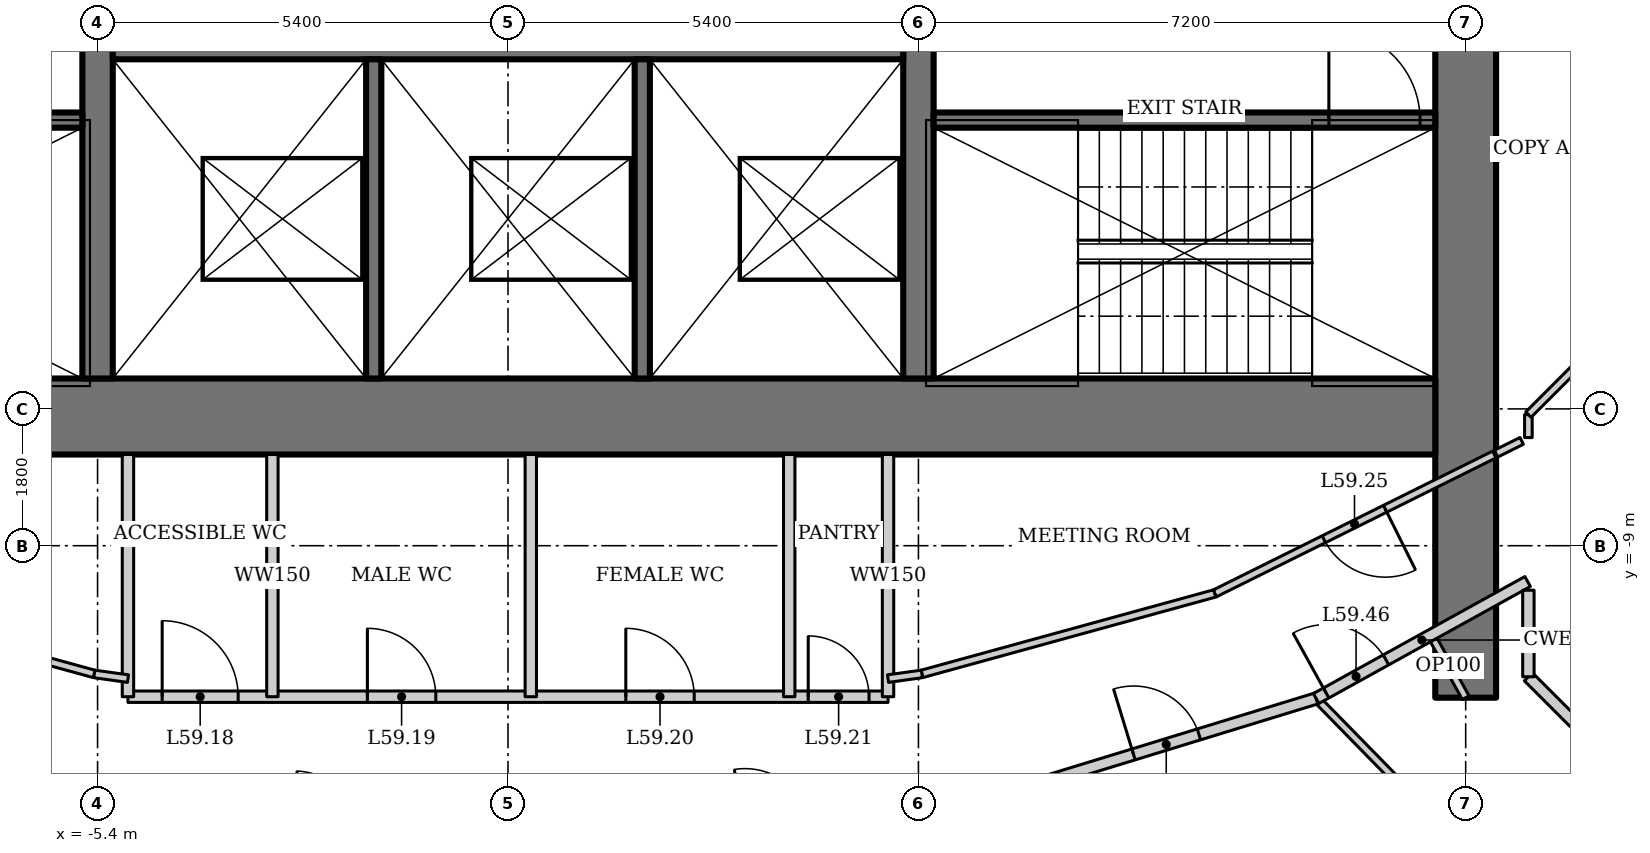
"""IFC4 building model, lengths in metres.
Left out: names, types, materials, properties, quantities, classifications, styles, units other than length and angle.
Written with IfcOpenShell. Run it as: python <this file> out.ifc"""

import sys

from ifc_helpers import new_model, si_unit, direction, frame, frame_2d, origin, place, context, subcontext, project, spatial, rectangle, extrude, element, fill, save


model = new_model("IFC4")
c1 = context("Model", 3, precision=1e-05, world=origin(), true_north=direction((0.0, 1.0)))
c2 = subcontext(c1, "Body", "Model", "MODEL_VIEW")
j1 = project(units=[si_unit("LENGTHUNIT", "METRE"), si_unit("PLANEANGLEUNIT", "RADIAN")], contexts=[c1])
p1 = place(None, origin())
s1 = spatial("IfcSite", under=j1, at=p1, CompositionType="ELEMENT")
p2 = place(p1, origin())
s2 = spatial("IfcBuilding", under=s1, at=p2, CompositionType="ELEMENT")
p3 = place(p2, frame((0.0, 0.0, 253.6)))
s3 = spatial("IfcBuildingStorey", under=s2, at=p3, CompositionType="ELEMENT", Elevation=253.6)
p4 = place(p3, frame((12.6, -11.0, 0.0), z_axis=(0.0, 0.0, 1.0), x_axis=(0.0, 1.0, 0.0)))
e1 = element("IfcWall", 1, at=p4, inside=s3, PredefinedType="SHEAR", context=c2, shape_type="SweptSolid", body=[
    extrude(rectangle(XDim=22.0, YDim=0.8, at=frame_2d((11.0, 0.0))), origin(), (0.0, 0.0, 1.0), 4.2),
])
p5 = place(p4, frame((10.1, 0.0, 0.0)))
e2 = element("IfcOpeningElement", 2, at=p5, cuts=e1, PredefinedType="OPENING", context=c2, shape_type="SweptSolid", body=[
    extrude(rectangle(XDim=1.8, YDim=2.1, at=frame_2d((0.9, 1.05))), frame((0.0, 0.41, 0.0), z_axis=(0.0, -1.0, 0.0), x_axis=(1.0, 0.0, 0.0)), (0.0, 0.0, 1.0), 0.82),
])
p6 = place(p3, frame((-12.2, -7.3, 0.0), z_axis=(0.0, 0.0, 1.0), x_axis=(1.0, 0.0, 0.0)))
e3 = element("IfcWall", 3, at=p6, inside=s3, PredefinedType="SHEAR", context=c2, shape_type="SweptSolid", body=[
    extrude(rectangle(XDim=24.4, YDim=1.0, at=frame_2d((12.2, 0.0))), origin(), (0.0, 0.0, 1.0), 4.2),
])
p7 = place(p3, frame((5.4, -6.8, 0.0), z_axis=(0.0, 0.0, 1.0), x_axis=(0.0, 1.0, 0.0)))
e4 = element("IfcWall", 4, at=p7, inside=s3, PredefinedType="SHEAR", context=c2, shape_type="SweptSolid", body=[
    extrude(rectangle(XDim=14.6, YDim=0.4, at=frame_2d((7.3, 0.0))), origin(), (0.0, 0.0, 1.0), 4.2),
])
p8 = place(p7, frame((5.9, 0.0, 0.0)))
e5 = element("IfcOpeningElement", 5, at=p8, cuts=e4, PredefinedType="OPENING", context=c2, shape_type="SweptSolid", body=[
    extrude(rectangle(XDim=1.8, YDim=2.1, at=frame_2d((0.9, 1.05))), frame((0.0, 0.21, 0.0), z_axis=(0.0, -1.0, 0.0), x_axis=(1.0, 0.0, 0.0)), (0.0, 0.0, 1.0), 0.42),
])
p9 = place(p3, frame((-5.4, 7.8, 0.0), z_axis=(0.0, 0.0, 1.0), x_axis=(0.0, -1.0, 0.0)))
e6 = element("IfcWall", 6, at=p9, inside=s3, PredefinedType="SHEAR", context=c2, shape_type="SweptSolid", body=[
    extrude(rectangle(XDim=14.6, YDim=0.4, at=frame_2d((7.3, 0.0))), origin(), (0.0, 0.0, 1.0), 4.2),
])
p10 = place(p9, frame((6.4, 0.0, 0.0)))
e7 = element("IfcOpeningElement", 7, at=p10, cuts=e6, PredefinedType="OPENING", context=c2, shape_type="SweptSolid", body=[
    extrude(rectangle(XDim=1.8, YDim=2.1, at=frame_2d((0.9, 1.05))), frame((0.0, 0.21, 0.0), z_axis=(0.0, -1.0, 0.0), x_axis=(1.0, 0.0, 0.0)), (0.0, 0.0, 1.0), 0.42),
])
p11 = place(p3, frame((-5.2, -2.4, 0.0), z_axis=(0.0, 0.0, 1.0), x_axis=(1.0, 0.0, 0.0)))
e8 = element("IfcWall", 8, at=p11, inside=s3, PredefinedType="SHEAR", context=c2, shape_type="SweptSolid", body=[
    extrude(rectangle(XDim=10.4, YDim=0.4, at=frame_2d((5.2, 0.0))), origin(), (0.0, 0.0, 1.0), 4.2),
])
p12 = place(p11, frame((1.683, 0.0, 0.0)))
e9 = element("IfcOpeningElement", 9, at=p12, cuts=e8, PredefinedType="OPENING", context=c2, shape_type="SweptSolid", body=[
    extrude(rectangle(XDim=1.1, YDim=2.2, at=frame_2d((0.55, 1.1))), frame((0.0, 0.21, 0.0), z_axis=(0.0, -1.0, 0.0), x_axis=(1.0, 0.0, 0.0)), (0.0, 0.0, 1.0), 0.42),
])
p13 = place(p11, frame((5.217, 0.0, 0.0)))
e10 = element("IfcOpeningElement", 10, at=p13, cuts=e8, PredefinedType="OPENING", context=c2, shape_type="SweptSolid", body=[
    extrude(rectangle(XDim=1.1, YDim=2.2, at=frame_2d((0.55, 1.1))), frame((0.0, 0.21, 0.0), z_axis=(0.0, -1.0, 0.0), x_axis=(1.0, 0.0, 0.0)), (0.0, 0.0, 1.0), 0.42),
])
p14 = place(p11, frame((8.75, 0.0, 0.0)))
e11 = element("IfcOpeningElement", 11, at=p14, cuts=e8, PredefinedType="OPENING", context=c2, shape_type="SweptSolid", body=[
    extrude(rectangle(XDim=1.1, YDim=2.2, at=frame_2d((0.55, 1.1))), frame((0.0, 0.21, 0.0), z_axis=(0.0, -1.0, 0.0), x_axis=(1.0, 0.0, 0.0)), (0.0, 0.0, 1.0), 0.42),
])
for number, where, z_axis, x_axis in (
    (12, (-1.767, -2.6, 0.0), (0.0, 0.0, 1.0), (0.0, -1.0, 0.0)),
    (13, (1.767, -2.6, 0.0), (0.0, 0.0, 1.0), (0.0, -1.0, 0.0)),
):
    element("IfcWall", number, at=place(p3, frame(where, z_axis=z_axis, x_axis=x_axis)), inside=s3, PredefinedType="SOLIDWALL", context=c2, shape_type="SweptSolid", body=[
        extrude(rectangle(XDim=4.2, YDim=0.2, at=frame_2d((2.1, 0.0))), origin(), (0.0, 0.0, 1.0), 4.2),
    ])
p15 = place(p3, frame((5.6, -3.4, 0.0), z_axis=(0.0, 0.0, 1.0), x_axis=(1.0, 0.0, 0.0)))
e14 = element("IfcWall", 14, at=p15, inside=s3, PredefinedType="SHEAR", context=c2, shape_type="SweptSolid", body=[
    extrude(rectangle(XDim=6.6, YDim=0.2, at=frame_2d((3.3, 0.0))), origin(), (0.0, 0.0, 1.0), 4.2),
])
p16 = place(p15, frame((5.2, 0.0, 0.0)))
e15 = element("IfcOpeningElement", 15, at=p16, cuts=e14, PredefinedType="OPENING", context=c2, shape_type="SweptSolid", body=[
    extrude(rectangle(XDim=1.2, YDim=2.1, at=frame_2d((0.6, 1.05))), frame((0.0, 0.11, 0.0), z_axis=(0.0, -1.0, 0.0), x_axis=(1.0, 0.0, 0.0)), (0.0, 0.0, 1.0), 0.22),
])
p17 = place(p3, frame((-5.6, -3.4, 0.0), z_axis=(0.0, 0.0, 1.0), x_axis=(-1.0, 0.0, 0.0)))
e16 = element("IfcWall", 16, at=p17, inside=s3, PredefinedType="SHEAR", context=c2, shape_type="SweptSolid", body=[
    extrude(rectangle(XDim=6.6, YDim=0.2, at=frame_2d((3.3, 0.0))), origin(), (0.0, 0.0, 1.0), 4.2),
])
p18 = place(p17, frame((5.2, 0.0, 0.0)))
e17 = element("IfcOpeningElement", 17, at=p18, cuts=e16, PredefinedType="OPENING", context=c2, shape_type="SweptSolid", body=[
    extrude(rectangle(XDim=1.2, YDim=2.1, at=frame_2d((0.6, 1.05))), frame((0.0, 0.11, 0.0), z_axis=(0.0, -1.0, 0.0), x_axis=(1.0, 0.0, 0.0)), (0.0, 0.0, 1.0), 0.22),
])
p19 = place(p3, frame((15.709, -16.199, 0.0), z_axis=(0.0, 0.0, 1.0), x_axis=(-0.699362525935, 0.714767135029, 0.0)))
e18 = element("IfcWall", 18, at=p19, inside=s3, PredefinedType="PARTITIONING", context=c2, shape_type="SweptSolid", body=[
    extrude(rectangle(XDim=7.259, YDim=0.1, at=frame_2d((3.629, 0.0))), origin(), (0.0, 0.0, 1.0), 3.41),
])
p20 = place(p3, frame((6.288, -12.341, 0.0), z_axis=(0.0, 0.0, 1.0), x_axis=(0.956185837153, 0.292760388079, 0.0)))
e19 = element("IfcWall", 19, at=p20, inside=s3, PredefinedType="PARTITIONING", context=c2, shape_type="SweptSolid", body=[
    extrude(rectangle(XDim=4.544, YDim=0.15, at=frame_2d((2.272, 0.0))), origin(), (0.0, 0.0, 1.0), 4.05),
])
p21 = place(p20, frame((2.031, 0.0, 0.0)))
e20 = element("IfcOpeningElement", 20, at=p21, cuts=e19, PredefinedType="OPENING", context=c2, shape_type="SweptSolid", body=[
    extrude(rectangle(XDim=0.9, YDim=2.1, at=frame_2d((0.45, 1.05))), frame((0.0, 0.085, 0.0), z_axis=(0.0, -1.0, 0.0), x_axis=(1.0, 0.0, 0.0)), (0.0, 0.0, 1.0), 0.17),
])
p22 = place(p3, frame((-5.0, -10.987, 0.0), z_axis=(0.0, 0.0, 1.0), x_axis=(1.0, 0.0, 0.0)))
e21 = element("IfcWall", 21, at=p22, inside=s3, PredefinedType="SOLIDWALL", context=c2, shape_type="SweptSolid", body=[
    extrude(rectangle(XDim=10.0, YDim=0.15, at=frame_2d((5.0, 0.0))), origin(), (0.0, 0.0, 1.0), 4.05),
])
p23 = place(p22, frame((0.45, 0.0, 0.0)))
e22 = element("IfcOpeningElement", 22, at=p23, cuts=e21, PredefinedType="OPENING", context=c2, shape_type="SweptSolid", body=[
    extrude(rectangle(XDim=1.0, YDim=2.1, at=frame_2d((0.5, 1.05))), frame((0.0, 0.085, 0.0), z_axis=(0.0, -1.0, 0.0), x_axis=(1.0, 0.0, 0.0)), (0.0, 0.0, 1.0), 0.17),
])
p24 = place(p22, frame((3.15, 0.0, 0.0)))
e23 = element("IfcOpeningElement", 23, at=p24, cuts=e21, PredefinedType="OPENING", context=c2, shape_type="SweptSolid", body=[
    extrude(rectangle(XDim=0.9, YDim=2.1, at=frame_2d((0.45, 1.05))), frame((0.0, 0.085, 0.0), z_axis=(0.0, -1.0, 0.0), x_axis=(1.0, 0.0, 0.0)), (0.0, 0.0, 1.0), 0.17),
])
p25 = place(p22, frame((6.55, 0.0, 0.0)))
e24 = element("IfcOpeningElement", 24, at=p25, cuts=e21, PredefinedType="OPENING", context=c2, shape_type="SweptSolid", body=[
    extrude(rectangle(XDim=0.9, YDim=2.1, at=frame_2d((0.45, 1.05))), frame((0.0, 0.085, 0.0), z_axis=(0.0, -1.0, 0.0), x_axis=(1.0, 0.0, 0.0)), (0.0, 0.0, 1.0), 0.17),
])
p26 = place(p22, frame((8.95, 0.0, 0.0)))
e25 = element("IfcOpeningElement", 25, at=p26, cuts=e21, PredefinedType="OPENING", context=c2, shape_type="SweptSolid", body=[
    extrude(rectangle(XDim=0.8, YDim=2.1, at=frame_2d((0.4, 1.05))), frame((0.0, 0.085, 0.0), z_axis=(0.0, -1.0, 0.0), x_axis=(1.0, 0.0, 0.0)), (0.0, 0.0, 1.0), 0.17),
])
for number, where, z_axis, x_axis in (
    (26, (-5.0, -7.8, 0.0), (0.0, 0.0, 1.0), (0.0, -1.0, 0.0)),
    (27, (5.0, -7.8, 0.0), (0.0, 0.0, 1.0), (0.0, -1.0, 0.0)),
    (28, (-3.1, -7.8, 0.0), (0.0, 0.0, 1.0), (0.0, -1.0, 0.0)),
    (29, (0.3, -7.8, 0.0), (0.0, 0.0, 1.0), (0.0, -1.0, 0.0)),
    (30, (3.7, -7.8, 0.0), (0.0, 0.0, 1.0), (0.0, -1.0, 0.0)),
):
    element("IfcWall", number, at=place(p3, frame(where, z_axis=z_axis, x_axis=x_axis)), inside=s3, PredefinedType="SOLIDWALL", context=c2, shape_type="SweptSolid", body=[
        extrude(rectangle(XDim=3.187, YDim=0.15, at=frame_2d((1.594, 0.0))), origin(), (0.0, 0.0, 1.0), 4.05),
    ])
p27 = place(p3, frame((-5.0, -10.749, 0.0), z_axis=(0.0, 0.0, 1.0), x_axis=(-0.990442882696, 0.137923515463, 0.0)))
e31 = element("IfcWall", 31, at=p27, inside=s3, PredefinedType="PARTITIONING", context=c2, shape_type="SweptSolid", body=[
    extrude(rectangle(XDim=0.45, YDim=0.1, at=frame_2d((0.225, 0.0))), origin(), (0.0, 0.0, 1.0), 4.05),
])
p28 = place(p3, frame((-5.445, -10.687, 0.0), z_axis=(0.0, 0.0, 1.0), x_axis=(-0.964244438722, 0.265014456954, 0.0)))
e32 = element("IfcWall", 32, at=p28, inside=s3, PredefinedType="PARTITIONING", context=c2, shape_type="SweptSolid", body=[
    extrude(rectangle(XDim=3.995, YDim=0.1, at=frame_2d((1.998, 0.0))), origin(), (0.0, 0.0, 1.0), 4.05),
])
p29 = place(p3, frame((12.977, -7.8, 0.0), z_axis=(0.0, 0.0, 1.0), x_axis=(-0.895529831139, -0.445001484874, 0.0)))
e33 = element("IfcWall", 33, at=p29, inside=s3, PredefinedType="PARTITIONING", context=c2, shape_type="SweptSolid", body=[
    extrude(rectangle(XDim=4.108, YDim=0.1, at=frame_2d((2.054, 0.0))), origin(), (0.0, 0.0, 1.0), 4.05),
])
p30 = place(p29, frame((1.604, 0.0, 0.0)))
e34 = element("IfcOpeningElement", 34, at=p30, cuts=e33, PredefinedType="OPENING", context=c2, shape_type="SweptSolid", body=[
    extrude(rectangle(XDim=0.9, YDim=2.1, at=frame_2d((0.45, 1.05))), frame((0.0, 0.06, 0.0), z_axis=(0.0, -1.0, 0.0), x_axis=(1.0, 0.0, 0.0)), (0.0, 0.0, 1.0), 0.12),
])
p31 = place(p3, frame((9.298, -9.628, 0.0), z_axis=(0.0, 0.0, 1.0), x_axis=(-0.964244438722, -0.265014456954, 0.0)))
e35 = element("IfcWall", 35, at=p31, inside=s3, PredefinedType="PARTITIONING", context=c2, shape_type="SweptSolid", body=[
    extrude(rectangle(XDim=3.995, YDim=0.1, at=frame_2d((1.998, 0.0))), origin(), (0.0, 0.0, 1.0), 4.05),
])
p32 = place(p3, frame((5.445, -10.687, 0.0), z_axis=(0.0, 0.0, 1.0), x_axis=(-0.990442882696, -0.137923515463, 0.0)))
e36 = element("IfcWall", 36, at=p32, inside=s3, PredefinedType="PARTITIONING", context=c2, shape_type="SweptSolid", body=[
    extrude(rectangle(XDim=0.45, YDim=0.1, at=frame_2d((0.225, 0.0))), origin(), (0.0, 0.0, 1.0), 4.05),
])
p33 = place(p3, frame((13.337, -7.621, 0.0), z_axis=(0.0, 0.0, 1.0), x_axis=(-0.895721570004, -0.444615416995, 0.0)))
e37 = element("IfcWall", 37, at=p33, inside=s3, PredefinedType="PARTITIONING", context=c2, shape_type="SweptSolid", body=[
    extrude(rectangle(XDim=0.376, YDim=0.1, at=frame_2d((0.188, 0.0))), origin(), (0.0, 0.0, 1.0), 4.05),
])
p34 = place(p3, frame((12.6, -11.0, 0.0), z_axis=(0.0, 0.0, 1.0), x_axis=(-0.484103558985, 0.875010710893, 0.0)))
e38 = element("IfcWall", 38, at=p34, inside=s3, PredefinedType="PARTITIONING", context=c2, shape_type="SweptSolid", body=[
    extrude(rectangle(XDim=0.943, YDim=0.1, at=frame_2d((0.472, 0.0))), origin(), (0.0, 0.0, 1.0), 4.05),
])
p35 = place(p3, frame((10.633, -11.01, 0.0), z_axis=(0.0, 0.0, 1.0), x_axis=(0.875072100837, 0.483992580869, 0.0)))
e39 = element("IfcWall", 39, at=p35, inside=s3, PredefinedType="PARTITIONING", context=c2, shape_type="SweptSolid", body=[
    extrude(rectangle(XDim=3.179, YDim=0.15, at=frame_2d((1.59, 0.0))), origin(), (0.0, 0.0, 1.0), 4.05),
])
p36 = place(p35, frame((0.15, 0.0, 0.0)))
e40 = element("IfcOpeningElement", 40, at=p36, cuts=e39, PredefinedType="OPENING", context=c2, shape_type="SweptSolid", body=[
    extrude(rectangle(XDim=0.9, YDim=2.1, at=frame_2d((0.45, 1.05))), frame((0.0, 0.085, 0.0), z_axis=(0.0, -1.0, 0.0), x_axis=(1.0, 0.0, 0.0)), (0.0, 0.0, 1.0), 0.17),
])
p37 = place(p3, frame((13.425, -7.578, 0.0), z_axis=(0.0, 0.0, 1.0), x_axis=(0.0, 1.0, 0.0)))
e41 = element("IfcWall", 41, at=p37, inside=s3, PredefinedType="PARTITIONING", context=c2, shape_type="SweptSolid", body=[
    extrude(rectangle(XDim=0.302, YDim=0.1, at=frame_2d((0.151, 0.0))), origin(), (0.0, 0.0, 1.0), 4.05),
])
p38 = place(p3, frame((13.425, -7.275, 0.0), z_axis=(0.0, 0.0, 1.0), x_axis=(0.707106781187, 0.707106781187, 0.0)))
e42 = element("IfcWall", 42, at=p38, inside=s3, PredefinedType="PARTITIONING", context=c2, shape_type="SweptSolid", body=[
    extrude(rectangle(XDim=0.849, YDim=0.1, at=frame_2d((0.425, 0.0))), origin(), (0.0, 0.0, 1.0), 4.05),
])
p39 = place(p3, frame((14.025, -11.325, 0.0), z_axis=(0.0, 0.0, 1.0), x_axis=(-0.707106781187, 0.707106781187, 0.0)))
e43 = element("IfcWall", 43, at=p39, inside=s3, PredefinedType="PARTITIONING", context=c2, shape_type="SweptSolid", body=[
    extrude(rectangle(XDim=0.849, YDim=0.15, at=frame_2d((0.425, 0.0))), origin(), (0.0, 0.0, 1.0), 4.05),
])
p40 = place(p3, frame((13.425, -10.725, 0.0), z_axis=(0.0, 0.0, 1.0), x_axis=(0.0, 1.0, 0.0)))
e44 = element("IfcWall", 44, at=p40, inside=s3, PredefinedType="PARTITIONING", context=c2, shape_type="SweptSolid", body=[
    extrude(rectangle(XDim=1.138, YDim=0.15, at=frame_2d((0.569, 0.0))), origin(), (0.0, 0.0, 1.0), 4.05),
])
p41 = place(p16, origin())
e45 = element("IfcDoor", 45, at=p41, inside=s3, OperationType="SINGLE_SWING_RIGHT", PredefinedType="DOOR", context=c2, shape_type="SweptSolid", body=[
    extrude(rectangle(XDim=1.2, YDim=2.1, at=frame_2d((0.6, 1.05))), frame((0.0, 0.025, 0.0), z_axis=(0.0, -1.0, 0.0), x_axis=(1.0, 0.0, 0.0)), (0.0, 0.0, 1.0), 0.05),
])
fill(e15, e45)
p42 = place(p23, origin())
e46 = element("IfcDoor", 46, at=p42, inside=s3, OperationType="SINGLE_SWING_LEFT", PredefinedType="DOOR", context=c2, shape_type="SweptSolid", body=[
    extrude(rectangle(XDim=1.0, YDim=2.1, at=frame_2d((0.5, 1.05))), frame((0.0, 0.025, 0.0), z_axis=(0.0, -1.0, 0.0), x_axis=(1.0, 0.0, 0.0)), (0.0, 0.0, 1.0), 0.05),
])
fill(e22, e46)
p43 = place(p24, origin())
e47 = element("IfcDoor", 47, at=p43, inside=s3, OperationType="SINGLE_SWING_LEFT", PredefinedType="DOOR", context=c2, shape_type="SweptSolid", body=[
    extrude(rectangle(XDim=0.9, YDim=2.1, at=frame_2d((0.45, 1.05))), frame((0.0, 0.025, 0.0), z_axis=(0.0, -1.0, 0.0), x_axis=(1.0, 0.0, 0.0)), (0.0, 0.0, 1.0), 0.05),
])
fill(e23, e47)
p44 = place(p25, origin())
e48 = element("IfcDoor", 48, at=p44, inside=s3, OperationType="SINGLE_SWING_LEFT", PredefinedType="DOOR", context=c2, shape_type="SweptSolid", body=[
    extrude(rectangle(XDim=0.9, YDim=2.1, at=frame_2d((0.45, 1.05))), frame((0.0, 0.025, 0.0), z_axis=(0.0, -1.0, 0.0), x_axis=(1.0, 0.0, 0.0)), (0.0, 0.0, 1.0), 0.05),
])
fill(e24, e48)
p45 = place(p26, origin())
e49 = element("IfcDoor", 49, at=p45, inside=s3, OperationType="SINGLE_SWING_LEFT", PredefinedType="DOOR", context=c2, shape_type="SweptSolid", body=[
    extrude(rectangle(XDim=0.8, YDim=2.1, at=frame_2d((0.4, 1.05))), frame((0.0, 0.025, 0.0), z_axis=(0.0, -1.0, 0.0), x_axis=(1.0, 0.0, 0.0)), (0.0, 0.0, 1.0), 0.05),
])
fill(e25, e49)
p46 = place(p30, origin())
e50 = element("IfcDoor", 50, at=p46, inside=s3, OperationType="SINGLE_SWING_LEFT", PredefinedType="DOOR", context=c2, shape_type="SweptSolid", body=[
    extrude(rectangle(XDim=0.9, YDim=2.1, at=frame_2d((0.45, 1.05))), frame((0.0, 0.025, 0.0), z_axis=(0.0, -1.0, 0.0), x_axis=(1.0, 0.0, 0.0)), (0.0, 0.0, 1.0), 0.05),
])
fill(e34, e50)
p47 = place(p21, origin())
e51 = element("IfcDoor", 51, at=p47, inside=s3, OperationType="SINGLE_SWING_LEFT", PredefinedType="DOOR", context=c2, shape_type="SweptSolid", body=[
    extrude(rectangle(XDim=0.9, YDim=2.1, at=frame_2d((0.45, 1.05))), frame((0.0, 0.025, 0.0), z_axis=(0.0, -1.0, 0.0), x_axis=(1.0, 0.0, 0.0)), (0.0, 0.0, 1.0), 0.05),
])
fill(e20, e51)
p48 = place(p36, origin())
e52 = element("IfcDoor", 52, at=p48, inside=s3, OperationType="SINGLE_SWING_LEFT", PredefinedType="DOOR", context=c2, shape_type="SweptSolid", body=[
    extrude(rectangle(XDim=0.9, YDim=2.1, at=frame_2d((0.45, 1.05))), frame((0.0, 0.025, 0.0), z_axis=(0.0, -1.0, 0.0), x_axis=(1.0, 0.0, 0.0)), (0.0, 0.0, 1.0), 0.05),
])
fill(e40, e52)
save(model, sys.argv[1])
